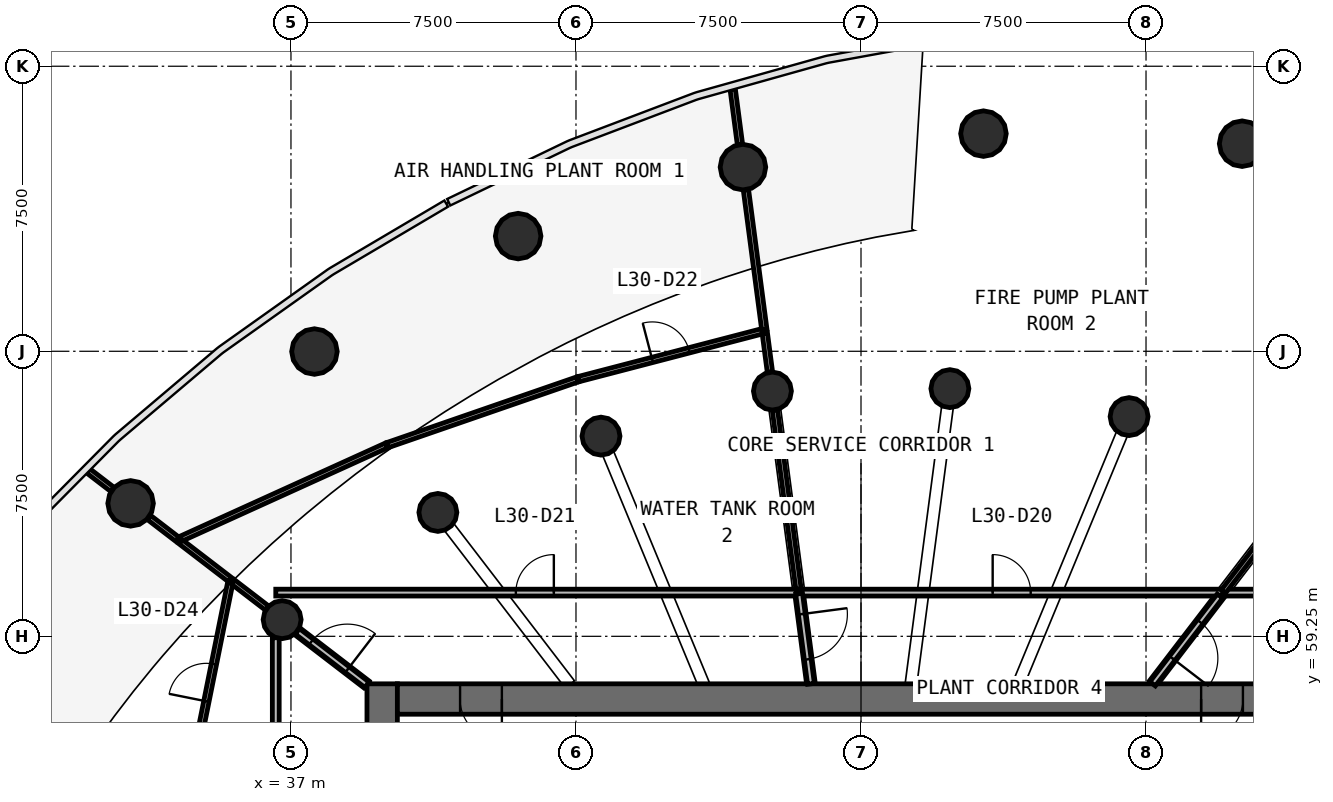
"""IFC4 building model, lengths in metres.
Left out: names, types, materials, properties, quantities, classifications, styles, units other than length and angle.
Written with IfcOpenShell. Run it as: python <this file> out.ifc"""

import sys

from ifc_helpers import new_model, si_unit, direction, frame, frame_2d, origin, origin_2d, place, context, subcontext, project, spatial, rectangle, circle, extrude, source, transform, mapped, element, fill, save


model = new_model("IFC4")
c1 = context("Model", 3, precision=1e-05, world=origin(), true_north=direction((0.0, 1.0)))
c2 = subcontext(c1, "Body", "Model", "MODEL_VIEW")
j1 = project(units=[si_unit("LENGTHUNIT", "METRE"), si_unit("PLANEANGLEUNIT", "RADIAN")], contexts=[c1])
p1 = place(None, origin())
s1 = spatial("IfcSite", under=j1, at=p1, CompositionType="ELEMENT")
p2 = place(p1, origin())
s2 = spatial("IfcBuilding", under=s1, at=p2, CompositionType="ELEMENT")
p3 = place(p2, frame((0.0, 0.0, 129.0)))
s3 = spatial("IfcBuildingStorey", under=s2, at=p3, CompositionType="ELEMENT", Elevation=129.0)
p4 = place(p3, frame((39.4, 58.0, 0.0), z_axis=(0.0, 0.0, 1.0), x_axis=(0.0, -1.0, 0.0)))
e1 = element("IfcWall", 1, at=p4, inside=s3, PredefinedType="SHEAR", context=c2, shape_type="SweptSolid", body=[
    extrude(rectangle(XDim=20.0, YDim=0.8, at=frame_2d((10.0, 0.0))), origin(), (0.0, 0.0, 1.0), 4.1),
])
p5 = place(p4, frame((9.1, 0.0, 0.0)))
e2 = element("IfcOpeningElement", 2, at=p5, cuts=e1, PredefinedType="OPENING", context=c2, shape_type="SweptSolid", body=[
    extrude(rectangle(XDim=1.8, YDim=2.1, at=frame_2d((0.9, 1.05))), frame((0.0, 0.41, 0.0), z_axis=(0.0, -1.0, 0.0), x_axis=(1.0, 0.0, 0.0)), (0.0, 0.0, 1.0), 0.82),
])
p6 = place(p3, frame((64.2, 57.6, 0.0), z_axis=(0.0, 0.0, 1.0), x_axis=(-1.0, 0.0, 0.0)))
e3 = element("IfcWall", 3, at=p6, inside=s3, PredefinedType="SHEAR", context=c2, shape_type="SweptSolid", body=[
    extrude(rectangle(XDim=24.4, YDim=0.8, at=frame_2d((12.2, 0.0))), origin(), (0.0, 0.0, 1.0), 4.1),
])
p7 = place(p6, frame((21.65, 0.0, 0.0)))
e4 = element("IfcOpeningElement", 4, at=p7, cuts=e3, PredefinedType="OPENING", context=c2, shape_type="SweptSolid", body=[
    extrude(rectangle(XDim=1.1, YDim=2.1, at=frame_2d((0.55, 1.05))), frame((0.0, 0.41, 0.0), z_axis=(0.0, -1.0, 0.0), x_axis=(1.0, 0.0, 0.0)), (0.0, 0.0, 1.0), 0.82),
])
p8 = place(p6, frame((2.15, 0.0, 0.0)))
e5 = element("IfcOpeningElement", 5, at=p8, cuts=e3, PredefinedType="OPENING", context=c2, shape_type="SweptSolid", body=[
    extrude(rectangle(XDim=1.1, YDim=2.1, at=frame_2d((0.55, 1.05))), frame((0.0, 0.41, 0.0), z_axis=(0.0, -1.0, 0.0), x_axis=(1.0, 0.0, 0.0)), (0.0, 0.0, 1.0), 0.82),
])
m1 = source(origin(), c2, "Body", "SweptSolid", [
    extrude(circle(Radius=0.6, at=origin_2d()), origin(), (0.0, 0.0, 1.0), 3.78),
])
for number, where, z_axis, x_axis in (
    (6, (62.029, 72.212, 0.0), (0.0, 0.0, 1.0), (1.0, 0.0, 0.0)),
    (7, (55.222, 72.477, 0.0), (0.0, 0.0, 1.0), (1.0, 0.0, 0.0)),
    (8, (48.894, 71.595, 0.0), (0.0, 0.0, 1.0), (1.0, 0.0, 0.0)),
    (9, (42.978, 69.781, 0.0), (0.0, 0.0, 1.0), (1.0, 0.0, 0.0)),
    (10, (37.618, 66.743, 0.0), (0.0, 0.0, 1.0), (1.0, 0.0, 0.0)),
    (11, (32.78, 62.748, 0.0), (0.0, 0.0, 1.0), (1.0, 0.0, 0.0)),
):
    element("IfcColumn", number, at=place(p3, frame(where, z_axis=z_axis, x_axis=x_axis)), inside=s3, PredefinedType="COLUMN", context=c2, shape_type="MappedRepresentation", body=[
        mapped(m1, transform((0.0, 0.0, 0.0), scale=1.0)),
    ])
m2 = source(origin(), c2, "Body", "SweptSolid", [
    extrude(circle(Radius=0.5, at=origin_2d()), origin(), (0.0, 0.0, 1.0), 3.78),
])
for number, where, z_axis, x_axis in (
    (12, (59.055, 65.031, 0.0), (0.0, 0.0, 1.0), (1.0, 0.0, 0.0)),
    (13, (54.339, 65.767, 0.0), (0.0, 0.0, 1.0), (1.0, 0.0, 0.0)),
    (14, (49.669, 65.703, 0.0), (0.0, 0.0, 1.0), (1.0, 0.0, 0.0)),
    (15, (45.158, 64.518, 0.0), (0.0, 0.0, 1.0), (1.0, 0.0, 0.0)),
    (16, (40.866, 62.51, 0.0), (0.0, 0.0, 1.0), (1.0, 0.0, 0.0)),
    (17, (36.768, 59.688, 0.0), (0.0, 0.0, 1.0), (1.0, 0.0, 0.0)),
):
    element("IfcColumn", number, at=place(p3, frame(where, z_axis=z_axis, x_axis=x_axis)), inside=s3, PredefinedType="COLUMN", context=c2, shape_type="MappedRepresentation", body=[
        mapped(m2, transform((0.0, 0.0, 0.0), scale=1.0)),
    ])
p9 = place(p3, frame((36.6, 60.4, 0.0), z_axis=(0.0, 0.0, 1.0), x_axis=(1.0, 0.0, 0.0)))
e18 = element("IfcWall", 18, at=p9, inside=s3, PredefinedType="PARTITIONING", context=c2, shape_type="SweptSolid", body=[
    extrude(rectangle(XDim=13.767, YDim=0.18, at=frame_2d((6.884, 0.0))), origin(), (0.0, 0.0, 1.0), 2.58),
])
p10 = place(p9, frame((6.317, 0.0, 0.0)))
e19 = element("IfcOpeningElement", 19, at=p10, cuts=e18, PredefinedType="OPENING", context=c2, shape_type="SweptSolid", body=[
    extrude(rectangle(XDim=1.0, YDim=2.1, at=frame_2d((0.5, 1.05))), frame((0.0, 0.1, 0.0), z_axis=(0.0, -1.0, 0.0), x_axis=(1.0, 0.0, 0.0)), (0.0, 0.0, 1.0), 0.2),
])
p11 = place(p3, frame((36.6, 45.973, 0.0), z_axis=(0.0, 0.0, 1.0), x_axis=(0.0, 1.0, 0.0)))
e20 = element("IfcWall", 20, at=p11, inside=s3, PredefinedType="PARTITIONING", context=c2, shape_type="SweptSolid", body=[
    extrude(rectangle(XDim=13.24, YDim=0.18, at=frame_2d((6.62, 0.0))), origin(), (0.0, 0.0, 1.0), 2.58),
])
p12 = place(p11, frame((6.19, 0.0, 0.0)))
e21 = element("IfcOpeningElement", 21, at=p12, cuts=e20, PredefinedType="OPENING", context=c2, shape_type="SweptSolid", body=[
    extrude(rectangle(XDim=1.0, YDim=2.1, at=frame_2d((0.5, 1.05))), frame((0.0, 0.1, 0.0), z_axis=(0.0, -1.0, 0.0), x_axis=(1.0, 0.0, 0.0)), (0.0, 0.0, 1.0), 0.2),
])
p13 = place(p3, frame((50.397, 60.4, 0.0), z_axis=(0.0, 0.0, 1.0), x_axis=(1.0, 0.0, 0.0)))
e22 = element("IfcWall", 22, at=p13, inside=s3, PredefinedType="PARTITIONING", context=c2, shape_type="SweptSolid", body=[
    extrude(rectangle(XDim=11.117, YDim=0.18, at=frame_2d((5.559, 0.0))), origin(), (0.0, 0.0, 1.0), 2.58),
])
p14 = place(p13, frame((5.067, 0.0, 0.0)))
e23 = element("IfcOpeningElement", 23, at=p14, cuts=e22, PredefinedType="OPENING", context=c2, shape_type="SweptSolid", body=[
    extrude(rectangle(XDim=1.0, YDim=2.1, at=frame_2d((0.5, 1.05))), frame((0.0, 0.1, 0.0), z_axis=(0.0, -1.0, 0.0), x_axis=(1.0, 0.0, 0.0)), (0.0, 0.0, 1.0), 0.2),
])
p15 = place(p3, frame((67.37, 60.4, 0.0), z_axis=(0.0, 0.0, 1.0), x_axis=(-1.0, 0.0, 0.0)))
e24 = element("IfcWall", 24, at=p15, inside=s3, PredefinedType="PARTITIONING", context=c2, shape_type="SweptSolid", body=[
    extrude(rectangle(XDim=5.825, YDim=0.18, at=frame_2d((2.913, 0.0))), origin(), (0.0, 0.0, 1.0), 2.58),
])
p16 = place(p3, frame((61.446, 60.31, 0.0), z_axis=(0.0, 0.0, 1.0), x_axis=(-0.608737787706, -0.793371480341, 0.0)))
e25 = element("IfcWall", 25, at=p16, inside=s3, PredefinedType="PARTITIONING", context=c2, shape_type="SweptSolid", body=[
    extrude(rectangle(XDim=2.912, YDim=0.18, at=frame_2d((1.456, 0.0))), origin(), (0.0, 0.0, 1.0), 2.58),
])
p17 = place(p16, frame((0.862, 0.0, 0.0)))
e26 = element("IfcOpeningElement", 26, at=p17, cuts=e25, PredefinedType="OPENING", context=c2, shape_type="SweptSolid", body=[
    extrude(rectangle(XDim=1.2, YDim=2.1, at=frame_2d((0.6, 1.05))), frame((0.0, 0.1, 0.0), z_axis=(0.0, -1.0, 0.0), x_axis=(1.0, 0.0, 0.0)), (0.0, 0.0, 1.0), 0.2),
])
p18 = place(p3, frame((50.371, 60.37, 0.0), z_axis=(0.0, 0.0, 1.0), x_axis=(0.13060507681, -0.991434472828, 0.0)))
e27 = element("IfcWall", 27, at=p18, inside=s3, PredefinedType="PARTITIONING", context=c2, shape_type="SweptSolid", body=[
    extrude(rectangle(XDim=2.391, YDim=0.18, at=frame_2d((1.195, 0.0))), origin(), (0.0, 0.0, 1.0), 2.58),
])
p19 = place(p18, frame((0.541, 0.0, 0.0)))
e28 = element("IfcOpeningElement", 28, at=p19, cuts=e27, PredefinedType="OPENING", context=c2, shape_type="SweptSolid", body=[
    extrude(rectangle(XDim=1.2, YDim=2.1, at=frame_2d((0.6, 1.05))), frame((0.0, 0.1, 0.0), z_axis=(0.0, -1.0, 0.0), x_axis=(1.0, 0.0, 0.0)), (0.0, 0.0, 1.0), 0.2),
])
p20 = place(p3, frame((37.168, 59.381, 0.0), z_axis=(0.0, 0.0, 1.0), x_axis=(0.793393624489, -0.608708926023, 0.0)))
e29 = element("IfcWall", 29, at=p20, inside=s3, PredefinedType="PARTITIONING", context=c2, shape_type="SweptSolid", body=[
    extrude(rectangle(XDim=2.309, YDim=0.18, at=frame_2d((1.155, 0.0))), origin(), (0.0, 0.0, 1.0), 2.58),
])
p21 = place(p20, frame((0.459, 0.0, 0.0)))
e30 = element("IfcOpeningElement", 30, at=p21, cuts=e29, PredefinedType="OPENING", context=c2, shape_type="SweptSolid", body=[
    extrude(rectangle(XDim=1.2, YDim=2.1, at=frame_2d((0.6, 1.05))), frame((0.0, 0.1, 0.0), z_axis=(0.0, -1.0, 0.0), x_axis=(1.0, 0.0, 0.0)), (0.0, 0.0, 1.0), 0.2),
])
p22 = place(p3, frame((39.514, 64.272, 0.0), z_axis=(0.0, 0.0, 1.0), x_axis=(-0.910630285698, -0.413222074397, 0.0)))
e31 = element("IfcWall", 31, at=p22, inside=s3, PredefinedType="PARTITIONING", context=c2, shape_type="SweptSolid", body=[
    extrude(rectangle(XDim=6.018, YDim=0.14, at=frame_2d((3.009, 0.0))), origin(), (0.0, 0.0, 1.0), 2.58),
])
p23 = place(p3, frame((34.328, 55.32, 0.0), z_axis=(0.0, 0.0, 1.0), x_axis=(0.197248441668, 0.980353534323, 0.0)))
e32 = element("IfcWall", 32, at=p23, inside=s3, PredefinedType="PARTITIONING", context=c2, shape_type="SweptSolid", body=[
    extrude(rectangle(XDim=5.514, YDim=0.14, at=frame_2d((2.757, 0.0))), origin(), (0.0, 0.0, 1.0), 2.58),
])
p24 = place(p23, frame((2.264, 0.0, 0.0)))
e33 = element("IfcOpeningElement", 33, at=p24, cuts=e32, PredefinedType="OPENING", context=c2, shape_type="SweptSolid", body=[
    extrude(rectangle(XDim=1.0, YDim=2.1, at=frame_2d((0.5, 1.05))), frame((0.0, 0.08, 0.0), z_axis=(0.0, -1.0, 0.0), x_axis=(1.0, 0.0, 0.0)), (0.0, 0.0, 1.0), 0.16),
])
p25 = place(p3, frame((44.54, 66.01, 0.0), z_axis=(0.0, 0.0, 1.0), x_axis=(-0.945116087861, -0.326734724918, 0.0)))
e34 = element("IfcWall", 34, at=p25, inside=s3, PredefinedType="PARTITIONING", context=c2, shape_type="SweptSolid", body=[
    extrude(rectangle(XDim=5.288, YDim=0.14, at=frame_2d((2.644, 0.0))), origin(), (0.0, 0.0, 1.0), 2.58),
])
p26 = place(p3, frame((44.569, 66.017, 0.0), z_axis=(0.0, 0.0, 1.0), x_axis=(0.967691095233, 0.252138739998, 0.0)))
e35 = element("IfcWall", 35, at=p26, inside=s3, PredefinedType="PARTITIONING", context=c2, shape_type="SweptSolid", body=[
    extrude(rectangle(XDim=5.054, YDim=0.14, at=frame_2d((2.527, 0.0))), origin(), (0.0, 0.0, 1.0), 2.58),
])
p27 = place(p26, frame((2.004, 0.0, 0.0)))
e36 = element("IfcOpeningElement", 36, at=p27, cuts=e35, PredefinedType="OPENING", context=c2, shape_type="SweptSolid", body=[
    extrude(rectangle(XDim=1.0, YDim=2.1, at=frame_2d((0.5, 1.05))), frame((0.0, 0.08, 0.0), z_axis=(0.0, -1.0, 0.0), x_axis=(1.0, 0.0, 0.0)), (0.0, 0.0, 1.0), 0.16),
])
p28 = place(p3, frame((50.356, 60.49, 0.0), z_axis=(0.0, 0.0, 1.0), x_axis=(-0.130548834981, 0.991441880135, 0.0)))
e37 = element("IfcWall", 37, at=p28, inside=s3, PredefinedType="PARTITIONING", context=c2, shape_type="SweptSolid", body=[
    extrude(rectangle(XDim=4.754, YDim=0.14, at=frame_2d((2.377, 0.0))), origin(), (0.0, 0.0, 1.0), 2.58),
])
p29 = place(p3, frame((49.456, 67.322, 0.0), z_axis=(0.0, 0.0, 1.0), x_axis=(-0.130558454313, 0.991440613455, 0.0)))
e38 = element("IfcWall", 38, at=p29, inside=s3, PredefinedType="PARTITIONING", context=c2, shape_type="SweptSolid", body=[
    extrude(rectangle(XDim=3.706, YDim=0.14, at=frame_2d((1.853, 0.0))), origin(), (0.0, 0.0, 1.0), 2.58),
])
p30 = place(p3, frame((61.537, 60.429, 0.0), z_axis=(0.0, 0.0, 1.0), x_axis=(0.608754323654, 0.793358792371, 0.0)))
e39 = element("IfcWall", 39, at=p30, inside=s3, PredefinedType="PARTITIONING", context=c2, shape_type="SweptSolid", body=[
    extrude(rectangle(XDim=3.271, YDim=0.14, at=frame_2d((1.635, 0.0))), origin(), (0.0, 0.0, 1.0), 2.58),
])
p31 = place(p3, frame((35.392, 60.744, 0.0), z_axis=(0.0, 0.0, 1.0), x_axis=(-0.793418526324, 0.608676467498, 0.0)))
e40 = element("IfcWall", 40, at=p31, inside=s3, PredefinedType="PARTITIONING", context=c2, shape_type="SweptSolid", body=[
    extrude(rectangle(XDim=1.632, YDim=0.14, at=frame_2d((0.816, 0.0))), origin(), (0.0, 0.0, 1.0), 2.58),
])
p32 = place(p3, frame((48.815, 72.195, 0.0), z_axis=(0.0, 0.0, 1.0), x_axis=(-0.13042446584, 0.991458248597, 0.0)))
e41 = element("IfcWall", 41, at=p32, inside=s3, PredefinedType="PARTITIONING", context=c2, shape_type="SweptSolid", body=[
    extrude(rectangle(XDim=1.471, YDim=0.14, at=frame_2d((0.736, 0.0))), origin(), (0.0, 0.0, 1.0), 2.98),
])
p33 = place(p3, frame((36.367, 59.995, 0.0), z_axis=(0.0, 0.0, 1.0), x_axis=(-0.793448671778, 0.60863717045, 0.0)))
e42 = element("IfcWall", 42, at=p33, inside=s3, PredefinedType="PARTITIONING", context=c2, shape_type="SweptSolid", body=[
    extrude(rectangle(XDim=1.122, YDim=0.14, at=frame_2d((0.561, 0.0))), origin(), (0.0, 0.0, 1.0), 2.58),
])
p34 = place(p3, frame((49.604, 66.203, 0.0), z_axis=(0.0, 0.0, 1.0), x_axis=(-0.130497554193, 0.991448631221, 0.0)))
e43 = element("IfcWall", 43, at=p34, inside=s3, PredefinedType="PARTITIONING", context=c2, shape_type="SweptSolid", body=[
    extrude(rectangle(XDim=1.027, YDim=0.14, at=frame_2d((0.514, 0.0))), origin(), (0.0, 0.0, 1.0), 2.58),
])
p35 = place(p3, frame((34.01, 61.804, 0.0), z_axis=(0.0, 0.0, 1.0), x_axis=(-0.793419442559, 0.60867527317, 0.0)))
e44 = element("IfcWall", 44, at=p35, inside=s3, PredefinedType="PARTITIONING", context=c2, shape_type="SweptSolid", body=[
    extrude(rectangle(XDim=0.946, YDim=0.14, at=frame_2d((0.473, 0.0))), origin(), (0.0, 0.0, 1.0), 2.58),
])
p36 = place(p3, frame((32.301, 63.116, 0.0), z_axis=(0.0, 0.0, 1.0), x_axis=(-0.793326455239, 0.608796464689, 0.0)))
e45 = element("IfcWall", 45, at=p36, inside=s3, PredefinedType="PARTITIONING", context=c2, shape_type="SweptSolid", body=[
    extrude(rectangle(XDim=0.801, YDim=0.14, at=frame_2d((0.4, 0.0))), origin(), (0.0, 0.0, 1.0), 2.98),
])
m3 = source(origin(), c2, "Body", "SweptSolid", [
    extrude(rectangle(XDim=1.1, YDim=2.1, at=frame_2d((0.55, 1.05))), frame((0.0, 0.025, 0.0), z_axis=(0.0, -1.0, 0.0), x_axis=(1.0, 0.0, 0.0)), (0.0, 0.0, 1.0), 0.05),
])
p37 = place(p7, origin())
e46 = element("IfcDoor", 46, at=p37, inside=s3, OperationType="SINGLE_SWING_LEFT", PredefinedType="DOOR", context=c2, shape_type="MappedRepresentation", body=[
    mapped(m3, transform((0.0, 0.0, 0.0), scale=1.0)),
])
fill(e4, e46)
p38 = place(p8, origin())
e47 = element("IfcDoor", 47, at=p38, inside=s3, OperationType="SINGLE_SWING_RIGHT", PredefinedType="DOOR", context=c2, shape_type="MappedRepresentation", body=[
    mapped(m3, transform((0.0, 0.0, 0.0), scale=1.0)),
])
fill(e5, e47)
m4 = source(origin(), c2, "Body", "SweptSolid", [
    extrude(rectangle(XDim=1.0, YDim=2.1, at=frame_2d((0.5, 1.05))), frame((0.0, 0.025, 0.0), z_axis=(0.0, -1.0, 0.0), x_axis=(1.0, 0.0, 0.0)), (0.0, 0.0, 1.0), 0.05),
])
p39 = place(p14, origin())
e48 = element("IfcDoor", 48, at=p39, inside=s3, OperationType="SINGLE_SWING_LEFT", PredefinedType="DOOR", context=c2, shape_type="MappedRepresentation", body=[
    mapped(m4, transform((0.0, 0.0, 0.0), scale=1.0)),
])
fill(e23, e48)
p40 = place(p10, origin())
e49 = element("IfcDoor", 49, at=p40, inside=s3, OperationType="SINGLE_SWING_RIGHT", PredefinedType="DOOR", context=c2, shape_type="MappedRepresentation", body=[
    mapped(m4, transform((0.0, 0.0, 0.0), scale=1.0)),
])
fill(e19, e49)
p41 = place(p27, origin())
e50 = element("IfcDoor", 50, at=p41, inside=s3, OperationType="SINGLE_SWING_LEFT", PredefinedType="DOOR", context=c2, shape_type="MappedRepresentation", body=[
    mapped(m4, transform((0.0, 0.0, 0.0), scale=1.0)),
])
fill(e36, e50)
p42 = place(p24, origin())
e51 = element("IfcDoor", 51, at=p42, inside=s3, OperationType="SINGLE_SWING_LEFT", PredefinedType="DOOR", context=c2, shape_type="MappedRepresentation", body=[
    mapped(m4, transform((0.0, 0.0, 0.0), scale=1.0)),
])
fill(e33, e51)
m5 = source(origin(), c2, "Body", "SweptSolid", [
    extrude(rectangle(XDim=1.2, YDim=2.1, at=frame_2d((0.6, 1.05))), frame((0.0, 0.025, 0.0), z_axis=(0.0, -1.0, 0.0), x_axis=(1.0, 0.0, 0.0)), (0.0, 0.0, 1.0), 0.05),
])
p43 = place(p17, origin())
e52 = element("IfcDoor", 52, at=p43, inside=s3, OperationType="SINGLE_SWING_RIGHT", PredefinedType="DOOR", context=c2, shape_type="MappedRepresentation", body=[
    mapped(m5, transform((0.0, 0.0, 0.0), scale=1.0)),
])
fill(e26, e52)
p44 = place(p19, origin())
e53 = element("IfcDoor", 53, at=p44, inside=s3, OperationType="SINGLE_SWING_LEFT", PredefinedType="DOOR", context=c2, shape_type="MappedRepresentation", body=[
    mapped(m5, transform((0.0, 0.0, 0.0), scale=1.0)),
])
fill(e28, e53)
p45 = place(p21, origin())
e54 = element("IfcDoor", 54, at=p45, inside=s3, OperationType="SINGLE_SWING_RIGHT", PredefinedType="DOOR", context=c2, shape_type="MappedRepresentation", body=[
    mapped(m5, transform((0.0, 0.0, 0.0), scale=1.0)),
])
fill(e30, e54)
save(model, sys.argv[1])
